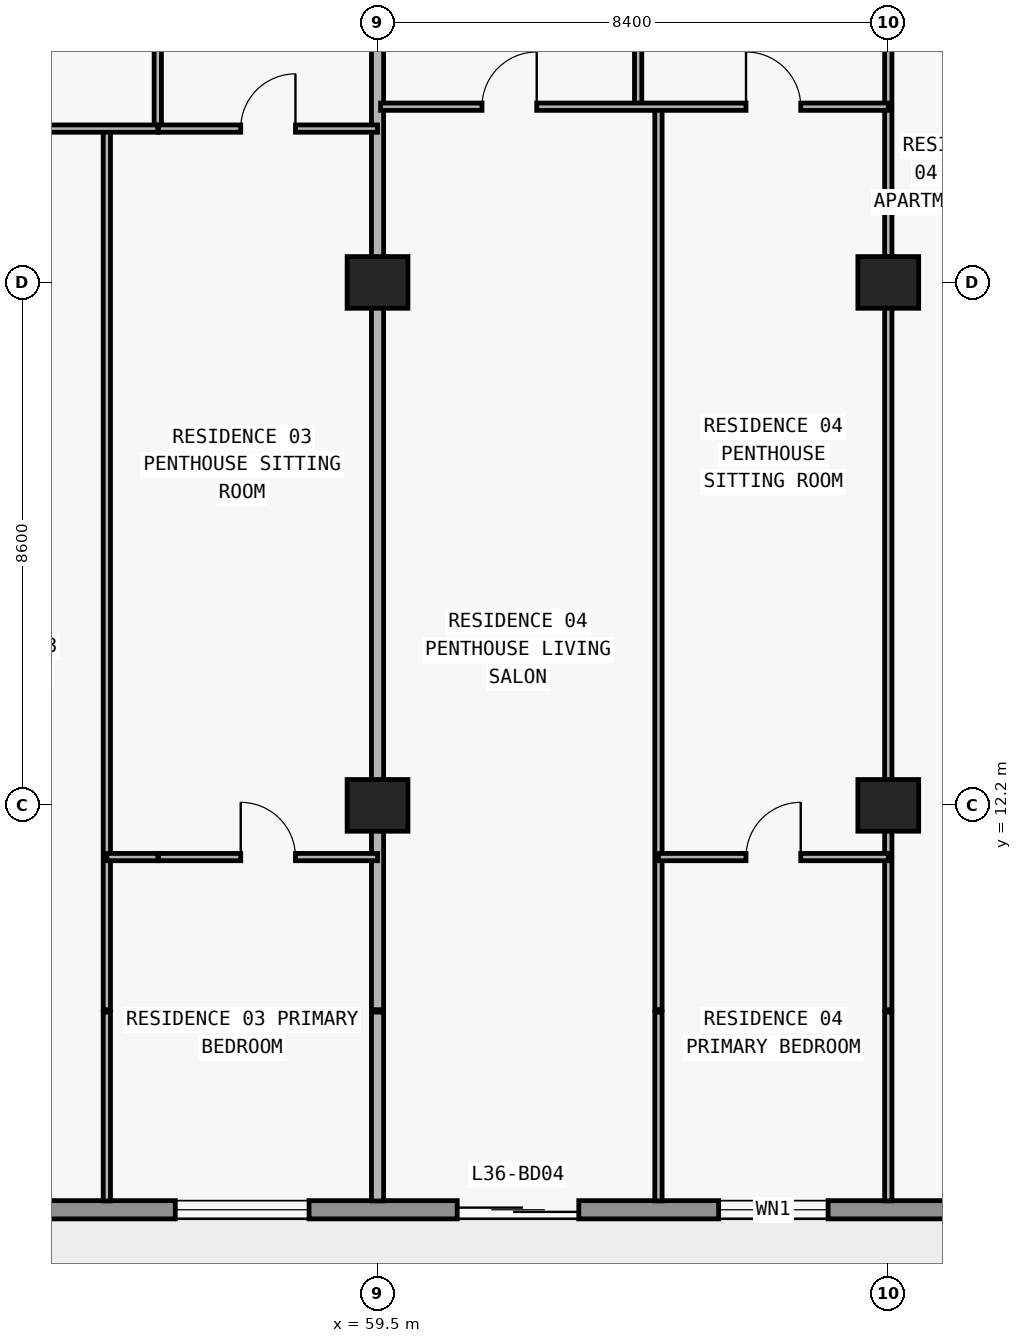
"""IFC4 building model, lengths in metres.
Left out: names, types, materials, properties, quantities, classifications, styles, units other than length and angle.
Written with IfcOpenShell. Run it as: python <this file> out.ifc"""

import sys

from ifc_helpers import new_model, si_unit, direction, frame, frame_2d, origin, origin_2d, place, context, subcontext, project, spatial, rectangle, extrude, element, fill, save


model = new_model("IFC4")
c1 = context("Model", 3, precision=1e-05, world=origin(), true_north=direction((0.0, 1.0)))
c2 = subcontext(c1, "Body", "Model", "MODEL_VIEW")
j1 = project(units=[si_unit("LENGTHUNIT", "METRE"), si_unit("PLANEANGLEUNIT", "RADIAN")], contexts=[c1])
p1 = place(None, origin())
s1 = spatial("IfcSite", under=j1, at=p1, CompositionType="ELEMENT")
p2 = place(p1, origin())
s2 = spatial("IfcBuilding", under=s1, at=p2, CompositionType="ELEMENT")
p3 = place(p2, frame((0.0, 0.0, 132.3)))
s3 = spatial("IfcBuildingStorey", under=s2, at=p3, CompositionType="ELEMENT", Elevation=132.3)
for number, where, z_axis, x_axis in (
    (1, (59.5, 12.2, 0.0), (0.0, 0.0, 1.0), (1.0, 0.0, 0.0)),
    (2, (67.9, 12.2, 0.0), (0.0, 0.0, 1.0), (1.0, 0.0, 0.0)),
    (3, (59.5, 20.8, 0.0), (0.0, 0.0, 1.0), (1.0, 0.0, 0.0)),
    (4, (67.9, 20.8, 0.0), (0.0, 0.0, 1.0), (1.0, 0.0, 0.0)),
):
    element("IfcColumn", number, at=place(p3, frame(where, z_axis=z_axis, x_axis=x_axis)), inside=s3, PredefinedType="COLUMN", context=c2, shape_type="SweptSolid", body=[
        extrude(rectangle(XDim=1.0, YDim=0.85, at=origin_2d()), origin(), (0.0, 0.0, 1.0), 3.05),
    ])
p4 = place(p3, frame((70.1, 5.55, 0.0), z_axis=(0.0, 0.0, 1.0), x_axis=(-1.0, 0.0, 0.0)))
e5 = element("IfcWall", 5, at=p4, inside=s3, PredefinedType="STANDARD", context=c2, shape_type="SweptSolid", body=[
    extrude(rectangle(XDim=62.4, YDim=0.3, at=frame_2d((31.2, 0.0))), origin(), (0.0, 0.0, 1.0), 3.05),
])
p5 = place(p4, frame((57.29, 0.0, 0.0)))
e6 = element("IfcOpeningElement", 6, at=p5, cuts=e5, PredefinedType="OPENING", context=c2, shape_type="SweptSolid", body=[
    extrude(rectangle(XDim=2.0, YDim=2.3, at=frame_2d((1.0, 1.15))), frame((0.0, 0.16, 0.0), z_axis=(0.0, -1.0, 0.0), x_axis=(1.0, 0.0, 0.0)), (0.0, 0.0, 1.0), 0.32),
])
p6 = place(p4, frame((52.61, 0.0, 0.65)))
e7 = element("IfcOpeningElement", 7, at=p6, cuts=e5, PredefinedType="OPENING", context=c2, shape_type="SweptSolid", body=[
    extrude(rectangle(XDim=2.6, YDim=1.85, at=frame_2d((1.3, 0.925))), frame((0.0, 0.16, 0.0), z_axis=(0.0, -1.0, 0.0), x_axis=(1.0, 0.0, 0.0)), (0.0, 0.0, 1.0), 0.32),
])
p7 = place(p4, frame((46.5, 0.0, 0.85)))
e8 = element("IfcOpeningElement", 8, at=p7, cuts=e5, PredefinedType="OPENING", context=c2, shape_type="SweptSolid", body=[
    extrude(rectangle(XDim=2.2, YDim=1.55, at=frame_2d((1.1, 0.775))), frame((0.0, 0.16, 0.0), z_axis=(0.0, -1.0, 0.0), x_axis=(1.0, 0.0, 0.0)), (0.0, 0.0, 1.0), 0.32),
])
p8 = place(p4, frame((40.49, 0.0, 0.0)))
e9 = element("IfcOpeningElement", 9, at=p8, cuts=e5, PredefinedType="OPENING", context=c2, shape_type="SweptSolid", body=[
    extrude(rectangle(XDim=2.0, YDim=2.3, at=frame_2d((1.0, 1.15))), frame((0.0, 0.16, 0.0), z_axis=(0.0, -1.0, 0.0), x_axis=(1.0, 0.0, 0.0)), (0.0, 0.0, 1.0), 0.32),
])
p9 = place(p4, frame((35.81, 0.0, 0.65)))
e10 = element("IfcOpeningElement", 10, at=p9, cuts=e5, PredefinedType="OPENING", context=c2, shape_type="SweptSolid", body=[
    extrude(rectangle(XDim=2.6, YDim=1.85, at=frame_2d((1.3, 0.925))), frame((0.0, 0.16, 0.0), z_axis=(0.0, -1.0, 0.0), x_axis=(1.0, 0.0, 0.0)), (0.0, 0.0, 1.0), 0.32),
])
p10 = place(p4, frame((30.1, 0.0, 0.85)))
e11 = element("IfcOpeningElement", 11, at=p10, cuts=e5, PredefinedType="OPENING", context=c2, shape_type="SweptSolid", body=[
    extrude(rectangle(XDim=2.2, YDim=1.55, at=frame_2d((1.1, 0.775))), frame((0.0, 0.16, 0.0), z_axis=(0.0, -1.0, 0.0), x_axis=(1.0, 0.0, 0.0)), (0.0, 0.0, 1.0), 0.32),
])
p11 = place(p4, frame((22.1, 0.0, 0.85)))
e12 = element("IfcOpeningElement", 12, at=p11, cuts=e5, PredefinedType="OPENING", context=c2, shape_type="SweptSolid", body=[
    extrude(rectangle(XDim=2.2, YDim=1.55, at=frame_2d((1.1, 0.775))), frame((0.0, 0.16, 0.0), z_axis=(0.0, -1.0, 0.0), x_axis=(1.0, 0.0, 0.0)), (0.0, 0.0, 1.0), 0.32),
])
p12 = place(p4, frame((16.026, 0.0, 0.0)))
e13 = element("IfcOpeningElement", 13, at=p12, cuts=e5, PredefinedType="OPENING", context=c2, shape_type="SweptSolid", body=[
    extrude(rectangle(XDim=2.0, YDim=2.3, at=frame_2d((1.0, 1.15))), frame((0.0, 0.16, 0.0), z_axis=(0.0, -1.0, 0.0), x_axis=(1.0, 0.0, 0.0)), (0.0, 0.0, 1.0), 0.32),
])
p13 = place(p4, frame((11.726, 0.0, 0.85)))
e14 = element("IfcOpeningElement", 14, at=p13, cuts=e5, PredefinedType="OPENING", context=c2, shape_type="SweptSolid", body=[
    extrude(rectangle(XDim=2.2, YDim=1.55, at=frame_2d((1.1, 0.775))), frame((0.0, 0.16, 0.0), z_axis=(0.0, -1.0, 0.0), x_axis=(1.0, 0.0, 0.0)), (0.0, 0.0, 1.0), 0.32),
])
p14 = place(p4, frame((7.29, 0.0, 0.0)))
e15 = element("IfcOpeningElement", 15, at=p14, cuts=e5, PredefinedType="OPENING", context=c2, shape_type="SweptSolid", body=[
    extrude(rectangle(XDim=2.0, YDim=2.3, at=frame_2d((1.0, 1.15))), frame((0.0, 0.16, 0.0), z_axis=(0.0, -1.0, 0.0), x_axis=(1.0, 0.0, 0.0)), (0.0, 0.0, 1.0), 0.32),
])
p15 = place(p4, frame((3.19, 0.0, 0.85)))
e16 = element("IfcOpeningElement", 16, at=p15, cuts=e5, PredefinedType="OPENING", context=c2, shape_type="SweptSolid", body=[
    extrude(rectangle(XDim=1.8, YDim=1.55, at=frame_2d((0.9, 0.775))), frame((0.0, 0.16, 0.0), z_axis=(0.0, -1.0, 0.0), x_axis=(1.0, 0.0, 0.0)), (0.0, 0.0, 1.0), 0.32),
])
p16 = place(p3, frame((55.048, 5.695, 0.0), z_axis=(0.0, 0.0, 1.0), x_axis=(0.0, 1.0, 0.0)))
e17 = element("IfcWall", 17, at=p16, inside=s3, PredefinedType="PARTITIONING", context=c2, shape_type="SweptSolid", body=[
    extrude(rectangle(XDim=3.105, YDim=0.12, at=frame_2d((1.552, 0.0))), origin(), (0.0, 0.0, 1.0), 3.05),
])
p17 = place(p3, frame((55.048, 8.84, 0.0), z_axis=(0.0, 0.0, 1.0), x_axis=(0.0, 1.0, 0.0)))
e18 = element("IfcWall", 18, at=p17, inside=s3, PredefinedType="PARTITIONING", context=c2, shape_type="SweptSolid", body=[
    extrude(rectangle(XDim=14.49, YDim=0.12, at=frame_2d((7.245, 0.0))), origin(), (0.0, 0.0, 1.0), 3.05),
])
p18 = place(p3, frame((55.886, 23.33, 0.0), z_axis=(0.0, 0.0, 1.0), x_axis=(0.0, 1.0, 0.0)))
e19 = element("IfcWall", 19, at=p18, inside=s3, PredefinedType="PARTITIONING", context=c2, shape_type="SweptSolid", body=[
    extrude(rectangle(XDim=5.15, YDim=0.12, at=frame_2d((2.575, 0.0))), origin(), (0.0, 0.0, 1.0), 3.05),
])
p19 = place(p18, frame((2.125, 0.0, 0.0)))
e20 = element("IfcOpeningElement", 20, at=p19, cuts=e19, PredefinedType="OPENING", context=c2, shape_type="SweptSolid", body=[
    extrude(rectangle(XDim=0.9, YDim=2.15, at=frame_2d((0.45, 1.075))), frame((0.0, 0.07, 0.0), z_axis=(0.0, -1.0, 0.0), x_axis=(1.0, 0.0, 0.0)), (0.0, 0.0, 1.0), 0.14),
])
p20 = place(p3, frame((59.5, 5.695, 0.0), z_axis=(0.0, 0.0, 1.0), x_axis=(0.0, 1.0, 0.0)))
e21 = element("IfcWall", 21, at=p20, inside=s3, PredefinedType="PARTITIONING", context=c2, shape_type="SweptSolid", body=[
    extrude(rectangle(XDim=3.105, YDim=0.2, at=frame_2d((1.552, 0.0))), origin(), (0.0, 0.0, 1.0), 3.05),
])
p21 = place(p3, frame((59.5, 8.84, 0.0), z_axis=(0.0, 0.0, 1.0), x_axis=(0.0, 1.0, 0.0)))
e22 = element("IfcWall", 22, at=p21, inside=s3, PredefinedType="PARTITIONING", context=c2, shape_type="SweptSolid", body=[
    extrude(rectangle(XDim=19.94, YDim=0.2, at=frame_2d((9.97, 0.0))), origin(), (0.0, 0.0, 1.0), 2.174),
])
p22 = place(p3, frame((63.786, 23.69, 0.0), z_axis=(0.0, 0.0, 1.0), x_axis=(0.0, 1.0, 0.0)))
e23 = element("IfcWall", 23, at=p22, inside=s3, PredefinedType="PARTITIONING", context=c2, shape_type="SweptSolid", body=[
    extrude(rectangle(XDim=5.09, YDim=0.12, at=frame_2d((2.545, 0.0))), origin(), (0.0, 0.0, 1.0), 3.05),
])
p23 = place(p22, frame((2.095, 0.0, 0.0)))
e24 = element("IfcOpeningElement", 24, at=p23, cuts=e23, PredefinedType="OPENING", context=c2, shape_type="SweptSolid", body=[
    extrude(rectangle(XDim=0.9, YDim=2.15, at=frame_2d((0.45, 1.075))), frame((0.0, 0.07, 0.0), z_axis=(0.0, -1.0, 0.0), x_axis=(1.0, 0.0, 0.0)), (0.0, 0.0, 1.0), 0.14),
])
p24 = place(p3, frame((64.12, 5.695, 0.0), z_axis=(0.0, 0.0, 1.0), x_axis=(0.0, 1.0, 0.0)))
e25 = element("IfcWall", 25, at=p24, inside=s3, PredefinedType="PARTITIONING", context=c2, shape_type="SweptSolid", body=[
    extrude(rectangle(XDim=3.105, YDim=0.12, at=frame_2d((1.552, 0.0))), origin(), (0.0, 0.0, 1.0), 3.05),
])
p25 = place(p3, frame((64.12, 8.84, 0.0), z_axis=(0.0, 0.0, 1.0), x_axis=(0.0, 1.0, 0.0)))
e26 = element("IfcWall", 26, at=p25, inside=s3, PredefinedType="PARTITIONING", context=c2, shape_type="SweptSolid", body=[
    extrude(rectangle(XDim=14.85, YDim=0.12, at=frame_2d((7.425, 0.0))), origin(), (0.0, 0.0, 1.0), 3.05),
])
p26 = place(p3, frame((67.9, 5.695, 0.0), z_axis=(0.0, 0.0, 1.0), x_axis=(0.0, 1.0, 0.0)))
e27 = element("IfcWall", 27, at=p26, inside=s3, PredefinedType="PARTITIONING", context=c2, shape_type="SweptSolid", body=[
    extrude(rectangle(XDim=3.105, YDim=0.12, at=frame_2d((1.552, 0.0))), origin(), (0.0, 0.0, 1.0), 3.05),
])
p27 = place(p3, frame((67.9, 8.84, 0.0), z_axis=(0.0, 0.0, 1.0), x_axis=(0.0, 1.0, 0.0)))
e28 = element("IfcWall", 28, at=p27, inside=s3, PredefinedType="PARTITIONING", context=c2, shape_type="SweptSolid", body=[
    extrude(rectangle(XDim=19.94, YDim=0.12, at=frame_2d((9.97, 0.0))), origin(), (0.0, 0.0, 1.0), 2.174),
])
p28 = place(p27, frame((16.945, 0.0, 0.0)))
e29 = element("IfcOpeningElement", 29, at=p28, cuts=e28, PredefinedType="OPENING", context=c2, shape_type="SweptSolid", body=[
    extrude(rectangle(XDim=0.9, YDim=2.124, at=frame_2d((0.45, 1.062))), frame((0.0, 0.07, 0.0), z_axis=(0.0, -1.0, 0.0), x_axis=(1.0, 0.0, 0.0)), (0.0, 0.0, 1.0), 0.14),
])
p29 = place(p3, frame((55.048, 11.35, 0.0), z_axis=(0.0, 0.0, 1.0), x_axis=(1.0, 0.0, 0.0)))
e30 = element("IfcWall", 30, at=p29, inside=s3, PredefinedType="PARTITIONING", context=c2, shape_type="SweptSolid", body=[
    extrude(rectangle(XDim=0.838, YDim=0.12, at=frame_2d((0.419, 0.0))), origin(), (0.0, 0.0, 1.0), 3.05),
])
p30 = place(p3, frame((55.9, 11.35, 0.0), z_axis=(0.0, 0.0, 1.0), x_axis=(1.0, 0.0, 0.0)))
e31 = element("IfcWall", 31, at=p30, inside=s3, PredefinedType="PARTITIONING", context=c2, shape_type="SweptSolid", body=[
    extrude(rectangle(XDim=3.6, YDim=0.12, at=frame_2d((1.8, 0.0))), origin(), (0.0, 0.0, 1.0), 3.05),
])
p31 = place(p30, frame((1.35, 0.0, 0.0)))
e32 = element("IfcOpeningElement", 32, at=p31, cuts=e31, PredefinedType="OPENING", context=c2, shape_type="SweptSolid", body=[
    extrude(rectangle(XDim=0.9, YDim=2.15, at=frame_2d((0.45, 1.075))), frame((0.0, 0.07, 0.0), z_axis=(0.0, -1.0, 0.0), x_axis=(1.0, 0.0, 0.0)), (0.0, 0.0, 1.0), 0.14),
])
p32 = place(p3, frame((64.12, 11.35, 0.0), z_axis=(0.0, 0.0, 1.0), x_axis=(1.0, 0.0, 0.0)))
e33 = element("IfcWall", 33, at=p32, inside=s3, PredefinedType="PARTITIONING", context=c2, shape_type="SweptSolid", body=[
    extrude(rectangle(XDim=3.78, YDim=0.12, at=frame_2d((1.89, 0.0))), origin(), (0.0, 0.0, 1.0), 3.05),
])
p33 = place(p32, frame((1.44, 0.0, 0.0)))
e34 = element("IfcOpeningElement", 34, at=p33, cuts=e33, PredefinedType="OPENING", context=c2, shape_type="SweptSolid", body=[
    extrude(rectangle(XDim=0.9, YDim=2.15, at=frame_2d((0.45, 1.075))), frame((0.0, 0.07, 0.0), z_axis=(0.0, -1.0, 0.0), x_axis=(1.0, 0.0, 0.0)), (0.0, 0.0, 1.0), 0.14),
])
p34 = place(p3, frame((51.32, 23.33, 0.0), z_axis=(0.0, 0.0, 1.0), x_axis=(1.0, 0.0, 0.0)))
e35 = element("IfcWall", 35, at=p34, inside=s3, PredefinedType="PARTITIONING", context=c2, shape_type="SweptSolid", body=[
    extrude(rectangle(XDim=4.566, YDim=0.12, at=frame_2d((2.283, 0.0))), origin(), (0.0, 0.0, 1.0), 3.05),
])
p35 = place(p34, frame((1.414, 0.0, 0.0)))
e36 = element("IfcOpeningElement", 36, at=p35, cuts=e35, PredefinedType="OPENING", context=c2, shape_type="SweptSolid", body=[
    extrude(rectangle(XDim=0.9, YDim=2.15, at=frame_2d((0.45, 1.075))), frame((0.0, 0.07, 0.0), z_axis=(0.0, -1.0, 0.0), x_axis=(1.0, 0.0, 0.0)), (0.0, 0.0, 1.0), 0.14),
])
p36 = place(p3, frame((55.9, 23.33, 0.0), z_axis=(0.0, 0.0, 1.0), x_axis=(1.0, 0.0, 0.0)))
e37 = element("IfcWall", 37, at=p36, inside=s3, PredefinedType="PARTITIONING", context=c2, shape_type="SweptSolid", body=[
    extrude(rectangle(XDim=3.6, YDim=0.12, at=frame_2d((1.8, 0.0))), origin(), (0.0, 0.0, 1.0), 3.05),
])
p37 = place(p36, frame((1.35, 0.0, 0.0)))
e38 = element("IfcOpeningElement", 38, at=p37, cuts=e37, PredefinedType="OPENING", context=c2, shape_type="SweptSolid", body=[
    extrude(rectangle(XDim=0.9, YDim=2.15, at=frame_2d((0.45, 1.075))), frame((0.0, 0.07, 0.0), z_axis=(0.0, -1.0, 0.0), x_axis=(1.0, 0.0, 0.0)), (0.0, 0.0, 1.0), 0.14),
])
p38 = place(p3, frame((59.55, 23.69, 0.0), z_axis=(0.0, 0.0, 1.0), x_axis=(1.0, 0.0, 0.0)))
e39 = element("IfcWall", 39, at=p38, inside=s3, PredefinedType="PARTITIONING", context=c2, shape_type="SweptSolid", body=[
    extrude(rectangle(XDim=8.35, YDim=0.12, at=frame_2d((4.175, 0.0))), origin(), (0.0, 0.0, 1.0), 3.05),
])
p39 = place(p38, frame((1.668, 0.0, 0.0)))
e40 = element("IfcOpeningElement", 40, at=p39, cuts=e39, PredefinedType="OPENING", context=c2, shape_type="SweptSolid", body=[
    extrude(rectangle(XDim=0.9, YDim=2.15, at=frame_2d((0.45, 1.075))), frame((0.0, 0.07, 0.0), z_axis=(0.0, -1.0, 0.0), x_axis=(1.0, 0.0, 0.0)), (0.0, 0.0, 1.0), 0.14),
])
p40 = place(p38, frame((6.01, 0.0, 0.0)))
e41 = element("IfcOpeningElement", 41, at=p40, cuts=e39, PredefinedType="OPENING", context=c2, shape_type="SweptSolid", body=[
    extrude(rectangle(XDim=0.9, YDim=2.15, at=frame_2d((0.45, 1.075))), frame((0.0, 0.07, 0.0), z_axis=(0.0, -1.0, 0.0), x_axis=(1.0, 0.0, 0.0)), (0.0, 0.0, 1.0), 0.14),
])
p41 = place(p13, origin())
e42 = element("IfcWindow", 42, at=p41, inside=s3, PartitioningType="SINGLE_PANEL", PredefinedType="WINDOW", context=c2, shape_type="SweptSolid", body=[
    extrude(rectangle(XDim=2.2, YDim=1.55, at=frame_2d((1.1, 0.775))), frame((0.0, 0.03, 0.0), z_axis=(0.0, -1.0, 0.0), x_axis=(1.0, 0.0, 0.0)), (0.0, 0.0, 1.0), 0.06),
])
fill(e14, e42)
p42 = place(p14, origin())
e43 = element("IfcDoor", 43, at=p42, inside=s3, OperationType="DOUBLE_DOOR_SLIDING", PredefinedType="DOOR", context=c2, shape_type="SweptSolid", body=[
    extrude(rectangle(XDim=2.0, YDim=2.3, at=frame_2d((1.0, 1.15))), frame((0.0, 0.025, 0.0), z_axis=(0.0, -1.0, 0.0), x_axis=(1.0, 0.0, 0.0)), (0.0, 0.0, 1.0), 0.05),
])
fill(e15, e43)
p43 = place(p15, origin())
e44 = element("IfcWindow", 44, at=p43, inside=s3, PartitioningType="SINGLE_PANEL", PredefinedType="WINDOW", context=c2, shape_type="SweptSolid", body=[
    extrude(rectangle(XDim=1.8, YDim=1.55, at=frame_2d((0.9, 0.775))), frame((0.0, 0.03, 0.0), z_axis=(0.0, -1.0, 0.0), x_axis=(1.0, 0.0, 0.0)), (0.0, 0.0, 1.0), 0.06),
])
fill(e16, e44)
p44 = place(p37, origin())
e45 = element("IfcDoor", 45, at=p44, inside=s3, OperationType="SINGLE_SWING_RIGHT", PredefinedType="DOOR", context=c2, shape_type="SweptSolid", body=[
    extrude(rectangle(XDim=0.9, YDim=2.15, at=frame_2d((0.45, 1.075))), frame((0.0, 0.025, 0.0), z_axis=(0.0, -1.0, 0.0), x_axis=(1.0, 0.0, 0.0)), (0.0, 0.0, 1.0), 0.05),
])
fill(e38, e45)
p45 = place(p31, origin())
e46 = element("IfcDoor", 46, at=p45, inside=s3, OperationType="SINGLE_SWING_LEFT", PredefinedType="DOOR", context=c2, shape_type="SweptSolid", body=[
    extrude(rectangle(XDim=0.9, YDim=2.15, at=frame_2d((0.45, 1.075))), frame((0.0, 0.025, 0.0), z_axis=(0.0, -1.0, 0.0), x_axis=(1.0, 0.0, 0.0)), (0.0, 0.0, 1.0), 0.05),
])
fill(e32, e46)
p46 = place(p39, origin())
e47 = element("IfcDoor", 47, at=p46, inside=s3, OperationType="SINGLE_SWING_RIGHT", PredefinedType="DOOR", context=c2, shape_type="SweptSolid", body=[
    extrude(rectangle(XDim=0.9, YDim=2.15, at=frame_2d((0.45, 1.075))), frame((0.0, 0.025, 0.0), z_axis=(0.0, -1.0, 0.0), x_axis=(1.0, 0.0, 0.0)), (0.0, 0.0, 1.0), 0.05),
])
fill(e40, e47)
p47 = place(p40, origin())
e48 = element("IfcDoor", 48, at=p47, inside=s3, OperationType="SINGLE_SWING_LEFT", PredefinedType="DOOR", context=c2, shape_type="SweptSolid", body=[
    extrude(rectangle(XDim=0.9, YDim=2.15, at=frame_2d((0.45, 1.075))), frame((0.0, 0.025, 0.0), z_axis=(0.0, -1.0, 0.0), x_axis=(1.0, 0.0, 0.0)), (0.0, 0.0, 1.0), 0.05),
])
fill(e41, e48)
p48 = place(p33, origin())
e49 = element("IfcDoor", 49, at=p48, inside=s3, OperationType="SINGLE_SWING_RIGHT", PredefinedType="DOOR", context=c2, shape_type="SweptSolid", body=[
    extrude(rectangle(XDim=0.9, YDim=2.15, at=frame_2d((0.45, 1.075))), frame((0.0, 0.025, 0.0), z_axis=(0.0, -1.0, 0.0), x_axis=(1.0, 0.0, 0.0)), (0.0, 0.0, 1.0), 0.05),
])
fill(e34, e49)
save(model, sys.argv[1])
